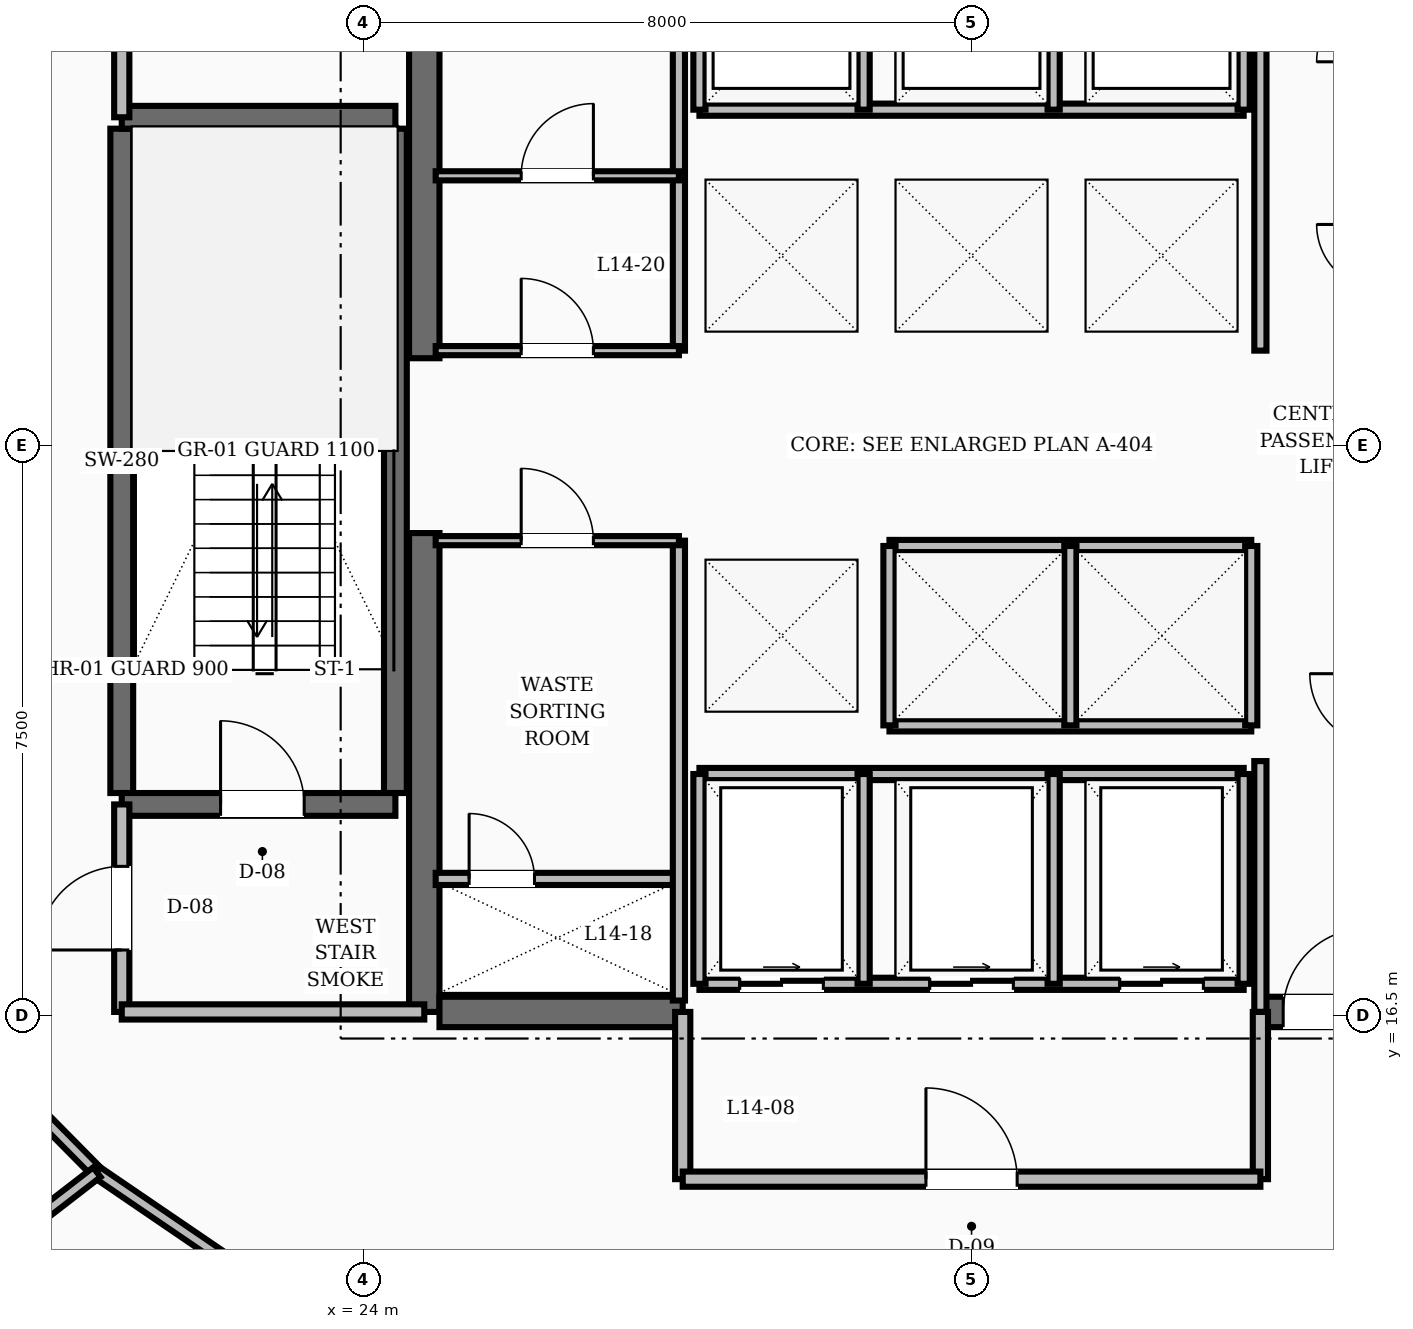
"""IFC4 building model, lengths in metres.
Left out: names, types, materials, properties, quantities, classifications, styles, units other than length and angle.
Written with IfcOpenShell. Run it as: python <this file> out.ifc"""

import sys

from ifc_helpers import new_model, si_unit, direction, frame, frame_2d, origin, place, context, subcontext, project, spatial, rectangle, extrude, element, fill, save


model = new_model("IFC4")
c1 = context("Model", 3, precision=1e-05, world=origin(), true_north=direction((0.0, 1.0)))
c2 = subcontext(c1, "Body", "Model", "MODEL_VIEW")
j1 = project(units=[si_unit("LENGTHUNIT", "METRE"), si_unit("PLANEANGLEUNIT", "RADIAN")], contexts=[c1])
p1 = place(None, origin())
s1 = spatial("IfcSite", under=j1, at=p1, CompositionType="ELEMENT")
p2 = place(p1, origin())
s2 = spatial("IfcBuilding", under=s1, at=p2, CompositionType="ELEMENT")
p3 = place(p2, frame((0.0, 0.0, 59.2)))
s3 = spatial("IfcBuildingStorey", under=s2, at=p3, CompositionType="ELEMENT", Elevation=59.2)
for number, where, z_axis, x_axis in (
    (1, (24.8, 16.55, 0.0), (0.0, 0.0, 1.0), (0.0, 1.0, 0.0)),
    (2, (24.8, 25.15, 0.0), (0.0, 0.0, 1.0), (0.0, 1.0, 0.0)),
):
    element("IfcWall", number, at=place(p3, frame(where, z_axis=z_axis, x_axis=x_axis)), inside=s3, PredefinedType="SHEAR", context=c2, shape_type="SweptSolid", body=[
        extrude(rectangle(XDim=6.3, YDim=0.4, at=frame_2d((3.15, 0.0))), origin(), (0.0, 0.0, 1.0), 3.6),
    ])
p4 = place(p3, frame((25.0, 16.55, 0.0), z_axis=(0.0, 0.0, 1.0), x_axis=(1.0, 0.0, 0.0)))
e3 = element("IfcWall", 3, at=p4, inside=s3, PredefinedType="SHEAR", context=c2, shape_type="SweptSolid", body=[
    extrude(rectangle(XDim=3.2, YDim=0.4, at=frame_2d((1.6, 0.0))), origin(), (0.0, 0.0, 1.0), 3.6),
])
p5 = place(p3, frame((35.8, 16.55, 0.0), z_axis=(0.0, 0.0, 1.0), x_axis=(1.0, 0.0, 0.0)))
e4 = element("IfcWall", 4, at=p5, inside=s3, PredefinedType="SHEAR", context=c2, shape_type="SweptSolid", body=[
    extrude(rectangle(XDim=3.2, YDim=0.4, at=frame_2d((1.6, 0.0))), origin(), (0.0, 0.0, 1.0), 3.6),
])
p6 = place(p5, frame((0.3, 0.0, 0.0)))
e5 = element("IfcOpeningElement", 5, at=p6, cuts=e4, PredefinedType="OPENING", context=c2, shape_type="SweptSolid", body=[
    extrude(rectangle(XDim=1.1, YDim=2.1, at=frame_2d((0.55, 1.05))), frame((0.0, 0.21, 0.0), z_axis=(0.0, -1.0, 0.0), x_axis=(1.0, 0.0, 0.0)), (0.0, 0.0, 1.0), 0.42),
])
for number, where, z_axis, x_axis in (
    (6, (20.82, 19.43, 0.0), (0.0, 0.0, 1.0), (0.0, 1.0, 0.0)),
    (7, (24.42, 19.43, 0.0), (0.0, 0.0, 1.0), (0.0, 1.0, 0.0)),
):
    element("IfcWall", number, at=place(p3, frame(where, z_axis=z_axis, x_axis=x_axis)), inside=s3, PredefinedType="SHEAR", context=c2, shape_type="SweptSolid", body=[
        extrude(rectangle(XDim=8.74, YDim=0.3, at=frame_2d((4.37, 0.0))), origin(), (0.0, 0.0, 1.0), 3.6),
    ])
p7 = place(p3, frame((20.82, 19.28, 0.0), z_axis=(0.0, 0.0, 1.0), x_axis=(1.0, 0.0, 0.0)))
e8 = element("IfcWall", 8, at=p7, inside=s3, PredefinedType="SHEAR", context=c2, shape_type="SweptSolid", body=[
    extrude(rectangle(XDim=3.6, YDim=0.3, at=frame_2d((1.8, 0.0))), origin(), (0.0, 0.0, 1.0), 3.6),
])
p8 = place(p7, frame((1.3, 0.0, 0.0)))
e9 = element("IfcOpeningElement", 9, at=p8, cuts=e8, PredefinedType="OPENING", context=c2, shape_type="SweptSolid", body=[
    extrude(rectangle(XDim=1.1, YDim=2.1, at=frame_2d((0.55, 1.05))), frame((0.0, 0.16, 0.0), z_axis=(0.0, -1.0, 0.0), x_axis=(1.0, 0.0, 0.0)), (0.0, 0.0, 1.0), 0.32),
])
p9 = place(p3, frame((20.82, 28.32, 0.0), z_axis=(0.0, 0.0, 1.0), x_axis=(1.0, 0.0, 0.0)))
e10 = element("IfcWall", 10, at=p9, inside=s3, PredefinedType="SHEAR", context=c2, shape_type="SweptSolid", body=[
    extrude(rectangle(XDim=3.6, YDim=0.3, at=frame_2d((1.8, 0.0))), origin(), (0.0, 0.0, 1.0), 3.6),
])
p10 = place(p3, frame((20.82, 16.55, 0.0), z_axis=(0.0, 0.0, 1.0), x_axis=(0.0, 1.0, 0.0)))
e11 = element("IfcWall", 11, at=p10, inside=s3, PredefinedType="SOLIDWALL", context=c2, shape_type="SweptSolid", body=[
    extrude(rectangle(XDim=2.73, YDim=0.2, at=frame_2d((1.365, 0.0))), origin(), (0.0, 0.0, 1.0), 2.61),
])
p11 = place(p10, frame((0.815, 0.0, 0.0)))
e12 = element("IfcOpeningElement", 12, at=p11, cuts=e11, PredefinedType="OPENING", context=c2, shape_type="SweptSolid", body=[
    extrude(rectangle(XDim=1.1, YDim=2.1, at=frame_2d((0.55, 1.05))), frame((0.0, 0.11, 0.0), z_axis=(0.0, -1.0, 0.0), x_axis=(1.0, 0.0, 0.0)), (0.0, 0.0, 1.0), 0.22),
])
p12 = place(p3, frame((20.82, 16.55, 0.0), z_axis=(0.0, 0.0, 1.0), x_axis=(1.0, 0.0, 0.0)))
e13 = element("IfcWall", 13, at=p12, inside=s3, PredefinedType="SOLIDWALL", context=c2, shape_type="SweptSolid", body=[
    extrude(rectangle(XDim=3.98, YDim=0.2, at=frame_2d((1.99, 0.0))), origin(), (0.0, 0.0, 1.0), 2.61),
])
p13 = place(p3, frame((20.82, 28.32, 0.0), z_axis=(0.0, 0.0, 1.0), x_axis=(0.0, 1.0, 0.0)))
e14 = element("IfcWall", 14, at=p13, inside=s3, PredefinedType="SOLIDWALL", context=c2, shape_type="SweptSolid", body=[
    extrude(rectangle(XDim=3.13, YDim=0.2, at=frame_2d((1.565, 0.0))), origin(), (0.0, 0.0, 1.0), 2.61),
])
p14 = place(p13, frame((1.09, 0.0, 0.0)))
e15 = element("IfcOpeningElement", 15, at=p14, cuts=e14, PredefinedType="OPENING", context=c2, shape_type="SweptSolid", body=[
    extrude(rectangle(XDim=0.95, YDim=2.1, at=frame_2d((0.475, 1.05))), frame((0.0, 0.11, 0.0), z_axis=(0.0, -1.0, 0.0), x_axis=(1.0, 0.0, 0.0)), (0.0, 0.0, 1.0), 0.22),
])
p15 = place(p3, frame((35.8, 16.55, 0.0), z_axis=(0.0, 0.0, 1.0), x_axis=(0.0, 1.0, 0.0)))
e16 = element("IfcWall", 16, at=p15, inside=s3, PredefinedType="SOLIDWALL", context=c2, shape_type="SweptSolid", body=[
    extrude(rectangle(XDim=3.3, YDim=0.16, at=frame_2d((1.65, 0.0))), origin(), (0.0, 0.0, 1.0), 2.61),
])
p16 = place(p3, frame((35.8, 25.25, 0.0), z_axis=(0.0, 0.0, 1.0), x_axis=(0.0, 1.0, 0.0)))
e17 = element("IfcWall", 17, at=p16, inside=s3, PredefinedType="SOLIDWALL", context=c2, shape_type="SweptSolid", body=[
    extrude(rectangle(XDim=6.2, YDim=0.16, at=frame_2d((3.1, 0.0))), origin(), (0.0, 0.0, 1.0), 2.61),
])
for number, where, z_axis, x_axis in (
    (18, (28.2, 14.35, 0.0), (0.0, 0.0, 1.0), (0.0, 1.0, 0.0)),
    (19, (35.8, 14.35, 0.0), (0.0, 0.0, 1.0), (0.0, 1.0, 0.0)),
):
    element("IfcWall", number, at=place(p3, frame(where, z_axis=z_axis, x_axis=x_axis)), inside=s3, PredefinedType="SOLIDWALL", context=c2, shape_type="SweptSolid", body=[
        extrude(rectangle(XDim=2.2, YDim=0.2, at=frame_2d((1.1, 0.0))), origin(), (0.0, 0.0, 1.0), 2.61),
    ])
p17 = place(p3, frame((28.2, 14.35, 0.0), z_axis=(0.0, 0.0, 1.0), x_axis=(1.0, 0.0, 0.0)))
e20 = element("IfcWall", 20, at=p17, inside=s3, PredefinedType="SOLIDWALL", context=c2, shape_type="SweptSolid", body=[
    extrude(rectangle(XDim=7.6, YDim=0.2, at=frame_2d((3.8, 0.0))), origin(), (0.0, 0.0, 1.0), 2.61),
])
p18 = place(p17, frame((3.2, 0.0, 0.0)))
e21 = element("IfcOpeningElement", 21, at=p18, cuts=e20, PredefinedType="OPENING", context=c2, shape_type="SweptSolid", body=[
    extrude(rectangle(XDim=1.2, YDim=2.1, at=frame_2d((0.6, 1.05))), frame((0.0, 0.11, 0.0), z_axis=(0.0, -1.0, 0.0), x_axis=(1.0, 0.0, 0.0)), (0.0, 0.0, 1.0), 0.22),
])
p19 = place(p3, frame((28.42, 28.42, 0.0), z_axis=(0.0, 0.0, 1.0), x_axis=(1.0, 0.0, 0.0)))
e22 = element("IfcWall", 22, at=p19, inside=s3, PredefinedType="SOLIDWALL", context=c2, shape_type="SweptSolid", body=[
    extrude(rectangle(XDim=7.16, YDim=0.16, at=frame_2d((3.58, 0.0))), origin(), (0.0, 0.0, 1.0), 2.61),
])
for number, where, z_axis, x_axis in (
    (23, (28.42, 28.42, 0.0), (0.0, 0.0, 1.0), (0.0, 1.0, 0.0)),
    (24, (30.58, 28.42, 0.0), (0.0, 0.0, 1.0), (0.0, 1.0, 0.0)),
    (25, (33.08, 28.42, 0.0), (0.0, 0.0, 1.0), (0.0, 1.0, 0.0)),
    (26, (35.58, 28.42, 0.0), (0.0, 0.0, 1.0), (0.0, 1.0, 0.0)),
):
    element("IfcWall", number, at=place(p3, frame(where, z_axis=z_axis, x_axis=x_axis)), inside=s3, PredefinedType="SOLIDWALL", context=c2, shape_type="SweptSolid", body=[
        extrude(rectangle(XDim=2.16, YDim=0.16, at=frame_2d((1.08, 0.0))), origin(), (0.0, 0.0, 1.0), 2.61),
    ])
for number, where, z_axis, x_axis in (
    (27, (30.92, 22.68, 0.0), (0.0, 0.0, 1.0), (1.0, 0.0, 0.0)),
    (28, (30.92, 20.32, 0.0), (0.0, 0.0, 1.0), (1.0, 0.0, 0.0)),
):
    element("IfcWall", number, at=place(p3, frame(where, z_axis=z_axis, x_axis=x_axis)), inside=s3, PredefinedType="SOLIDWALL", context=c2, shape_type="SweptSolid", body=[
        extrude(rectangle(XDim=4.76, YDim=0.16, at=frame_2d((2.38, 0.0))), origin(), (0.0, 0.0, 1.0), 2.61),
    ])
for number, where, z_axis, x_axis in (
    (29, (30.92, 20.32, 0.0), (0.0, 0.0, 1.0), (0.0, 1.0, 0.0)),
    (30, (33.3, 20.32, 0.0), (0.0, 0.0, 1.0), (0.0, 1.0, 0.0)),
    (31, (35.68, 20.32, 0.0), (0.0, 0.0, 1.0), (0.0, 1.0, 0.0)),
):
    element("IfcWall", number, at=place(p3, frame(where, z_axis=z_axis, x_axis=x_axis)), inside=s3, PredefinedType="SOLIDWALL", context=c2, shape_type="SweptSolid", body=[
        extrude(rectangle(XDim=2.36, YDim=0.16, at=frame_2d((1.18, 0.0))), origin(), (0.0, 0.0, 1.0), 2.61),
    ])
p20 = place(p3, frame((28.42, 16.92, 0.0), z_axis=(0.0, 0.0, 1.0), x_axis=(1.0, 0.0, 0.0)))
e32 = element("IfcWall", 32, at=p20, inside=s3, PredefinedType="SOLIDWALL", context=c2, shape_type="SweptSolid", body=[
    extrude(rectangle(XDim=7.16, YDim=0.16, at=frame_2d((3.58, 0.0))), origin(), (0.0, 0.0, 1.0), 2.61),
])
p21 = place(p20, frame((0.53, 0.0, 0.0)))
e33 = element("IfcOpeningElement", 33, at=p21, cuts=e32, PredefinedType="OPENING", context=c2, shape_type="SweptSolid", body=[
    extrude(rectangle(XDim=1.1, YDim=2.15, at=frame_2d((0.55, 1.075))), frame((0.0, 0.09, 0.0), z_axis=(0.0, -1.0, 0.0), x_axis=(1.0, 0.0, 0.0)), (0.0, 0.0, 1.0), 0.18),
])
p22 = place(p20, frame((3.03, 0.0, 0.0)))
e34 = element("IfcOpeningElement", 34, at=p22, cuts=e32, PredefinedType="OPENING", context=c2, shape_type="SweptSolid", body=[
    extrude(rectangle(XDim=1.1, YDim=2.15, at=frame_2d((0.55, 1.075))), frame((0.0, 0.09, 0.0), z_axis=(0.0, -1.0, 0.0), x_axis=(1.0, 0.0, 0.0)), (0.0, 0.0, 1.0), 0.18),
])
p23 = place(p20, frame((5.53, 0.0, 0.0)))
e35 = element("IfcOpeningElement", 35, at=p23, cuts=e32, PredefinedType="OPENING", context=c2, shape_type="SweptSolid", body=[
    extrude(rectangle(XDim=1.1, YDim=2.15, at=frame_2d((0.55, 1.075))), frame((0.0, 0.09, 0.0), z_axis=(0.0, -1.0, 0.0), x_axis=(1.0, 0.0, 0.0)), (0.0, 0.0, 1.0), 0.18),
])
p24 = place(p3, frame((28.42, 19.68, 0.0), z_axis=(0.0, 0.0, 1.0), x_axis=(1.0, 0.0, 0.0)))
e36 = element("IfcWall", 36, at=p24, inside=s3, PredefinedType="SOLIDWALL", context=c2, shape_type="SweptSolid", body=[
    extrude(rectangle(XDim=7.16, YDim=0.16, at=frame_2d((3.58, 0.0))), origin(), (0.0, 0.0, 1.0), 2.61),
])
for number, where, z_axis, x_axis in (
    (37, (28.42, 16.92, 0.0), (0.0, 0.0, 1.0), (0.0, 1.0, 0.0)),
    (38, (30.58, 16.92, 0.0), (0.0, 0.0, 1.0), (0.0, 1.0, 0.0)),
    (39, (33.08, 16.92, 0.0), (0.0, 0.0, 1.0), (0.0, 1.0, 0.0)),
    (40, (35.58, 16.92, 0.0), (0.0, 0.0, 1.0), (0.0, 1.0, 0.0)),
):
    element("IfcWall", number, at=place(p3, frame(where, z_axis=z_axis, x_axis=x_axis)), inside=s3, PredefinedType="SOLIDWALL", context=c2, shape_type="SweptSolid", body=[
        extrude(rectangle(XDim=2.76, YDim=0.16, at=frame_2d((1.38, 0.0))), origin(), (0.0, 0.0, 1.0), 2.61),
    ])
p25 = place(p3, frame((24.95, 18.3, 0.0), z_axis=(0.0, 0.0, 1.0), x_axis=(1.0, 0.0, 0.0)))
e41 = element("IfcWall", 41, at=p25, inside=s3, PredefinedType="SOLIDWALL", context=c2, shape_type="SweptSolid", body=[
    extrude(rectangle(XDim=3.2, YDim=0.16, at=frame_2d((1.6, 0.0))), origin(), (0.0, 0.0, 1.0), 2.61),
])
p26 = place(p25, frame((0.44, 0.0, 0.0)))
e42 = element("IfcOpeningElement", 42, at=p26, cuts=e41, PredefinedType="OPENING", context=c2, shape_type="SweptSolid", body=[
    extrude(rectangle(XDim=0.86, YDim=2.05, at=frame_2d((0.43, 1.025))), frame((0.0, 0.09, 0.0), z_axis=(0.0, -1.0, 0.0), x_axis=(1.0, 0.0, 0.0)), (0.0, 0.0, 1.0), 0.18),
])
p27 = place(p3, frame((28.15, 16.7, 0.0), z_axis=(0.0, 0.0, 1.0), x_axis=(0.0, 1.0, 0.0)))
e43 = element("IfcWall", 43, at=p27, inside=s3, PredefinedType="SOLIDWALL", context=c2, shape_type="SweptSolid", body=[
    extrude(rectangle(XDim=6.05, YDim=0.16, at=frame_2d((3.025, 0.0))), origin(), (0.0, 0.0, 1.0), 2.61),
])
p28 = place(p3, frame((28.15, 25.25, 0.0), z_axis=(0.0, 0.0, 1.0), x_axis=(0.0, 1.0, 0.0)))
e44 = element("IfcWall", 44, at=p28, inside=s3, PredefinedType="SOLIDWALL", context=c2, shape_type="SweptSolid", body=[
    extrude(rectangle(XDim=6.1, YDim=0.16, at=frame_2d((3.05, 0.0))), origin(), (0.0, 0.0, 1.0), 2.61),
])
p29 = place(p3, frame((24.95, 25.25, 0.0), z_axis=(0.0, 0.0, 1.0), x_axis=(1.0, 0.0, 0.0)))
e45 = element("IfcWall", 45, at=p29, inside=s3, PredefinedType="PARTITIONING", context=c2, shape_type="SweptSolid", body=[
    extrude(rectangle(XDim=3.2, YDim=0.12, at=frame_2d((1.6, 0.0))), origin(), (0.0, 0.0, 1.0), 2.61),
])
p30 = place(p29, frame((1.125, 0.0, 0.0)))
e46 = element("IfcOpeningElement", 46, at=p30, cuts=e45, PredefinedType="OPENING", context=c2, shape_type="SweptSolid", body=[
    extrude(rectangle(XDim=0.95, YDim=2.1, at=frame_2d((0.475, 1.05))), frame((0.0, 0.07, 0.0), z_axis=(0.0, -1.0, 0.0), x_axis=(1.0, 0.0, 0.0)), (0.0, 0.0, 1.0), 0.14),
])
p31 = place(p3, frame((24.95, 22.75, 0.0), z_axis=(0.0, 0.0, 1.0), x_axis=(1.0, 0.0, 0.0)))
e47 = element("IfcWall", 47, at=p31, inside=s3, PredefinedType="PARTITIONING", context=c2, shape_type="SweptSolid", body=[
    extrude(rectangle(XDim=3.2, YDim=0.12, at=frame_2d((1.6, 0.0))), origin(), (0.0, 0.0, 1.0), 2.61),
])
p32 = place(p31, frame((1.125, 0.0, 0.0)))
e48 = element("IfcOpeningElement", 48, at=p32, cuts=e47, PredefinedType="OPENING", context=c2, shape_type="SweptSolid", body=[
    extrude(rectangle(XDim=0.95, YDim=2.1, at=frame_2d((0.475, 1.05))), frame((0.0, 0.07, 0.0), z_axis=(0.0, -1.0, 0.0), x_axis=(1.0, 0.0, 0.0)), (0.0, 0.0, 1.0), 0.14),
])
p33 = place(p3, frame((24.95, 27.55, 0.0), z_axis=(0.0, 0.0, 1.0), x_axis=(1.0, 0.0, 0.0)))
e49 = element("IfcWall", 49, at=p33, inside=s3, PredefinedType="PARTITIONING", context=c2, shape_type="SweptSolid", body=[
    extrude(rectangle(XDim=3.2, YDim=0.12, at=frame_2d((1.6, 0.0))), origin(), (0.0, 0.0, 1.0), 2.61),
])
p34 = place(p33, frame((1.125, 0.0, 0.0)))
e50 = element("IfcOpeningElement", 50, at=p34, cuts=e49, PredefinedType="OPENING", context=c2, shape_type="SweptSolid", body=[
    extrude(rectangle(XDim=0.95, YDim=2.1, at=frame_2d((0.475, 1.05))), frame((0.0, 0.07, 0.0), z_axis=(0.0, -1.0, 0.0), x_axis=(1.0, 0.0, 0.0)), (0.0, 0.0, 1.0), 0.14),
])
p35 = place(p3, frame((18.469, 16.49, 0.0), z_axis=(0.0, 0.0, 1.0), x_axis=(0.702811997, -0.711375636969, 0.0)))
e51 = element("IfcWall", 51, at=p35, inside=s3, PredefinedType="SOLIDWALL", context=c2, shape_type="SweptSolid", body=[
    extrude(rectangle(XDim=2.879, YDim=0.16, at=frame_2d((1.44, 0.0))), origin(), (0.0, 0.0, 1.0), 2.61),
])
p36 = place(p3, frame((20.492, 14.441, 0.0), z_axis=(0.0, 0.0, 1.0), x_axis=(0.826293096206, -0.56324037423, 0.0)))
e52 = element("IfcWall", 52, at=p36, inside=s3, PredefinedType="SOLIDWALL", context=c2, shape_type="SweptSolid", body=[
    extrude(rectangle(XDim=2.985, YDim=0.16, at=frame_2d((1.492, 0.0))), origin(), (0.0, 0.0, 1.0), 2.61),
])
p37 = place(p3, frame((20.492, 14.441, 0.0), z_axis=(0.0, 0.0, 1.0), x_axis=(-0.791235454553, -0.611511615145, 0.0)))
e53 = element("IfcWall", 53, at=p37, inside=s3, PredefinedType="SOLIDWALL", context=c2, shape_type="SweptSolid", body=[
    extrude(rectangle(XDim=8.778, YDim=0.16, at=frame_2d((4.389, 0.0))), origin(), (0.0, 0.0, 1.0), 2.61),
])
p38 = place(p8, origin())
e54 = element("IfcDoor", 54, at=p38, inside=s3, OperationType="SINGLE_SWING_LEFT", PredefinedType="DOOR", context=c2, shape_type="SweptSolid", body=[
    extrude(rectangle(XDim=1.1, YDim=2.1, at=frame_2d((0.55, 1.05))), frame((0.0, 0.025, 0.0), z_axis=(0.0, -1.0, 0.0), x_axis=(1.0, 0.0, 0.0)), (0.0, 0.0, 1.0), 0.05),
])
fill(e9, e54)
p39 = place(p11, origin())
e55 = element("IfcDoor", 55, at=p39, inside=s3, OperationType="SINGLE_SWING_LEFT", PredefinedType="DOOR", context=c2, shape_type="SweptSolid", body=[
    extrude(rectangle(XDim=1.1, YDim=2.1, at=frame_2d((0.55, 1.05))), frame((0.0, 0.025, 0.0), z_axis=(0.0, -1.0, 0.0), x_axis=(1.0, 0.0, 0.0)), (0.0, 0.0, 1.0), 0.05),
])
fill(e12, e55)
p40 = place(p6, origin())
e56 = element("IfcDoor", 56, at=p40, inside=s3, OperationType="SINGLE_SWING_RIGHT", PredefinedType="DOOR", context=c2, shape_type="SweptSolid", body=[
    extrude(rectangle(XDim=1.1, YDim=2.1, at=frame_2d((0.55, 1.05))), frame((0.0, 0.025, 0.0), z_axis=(0.0, -1.0, 0.0), x_axis=(1.0, 0.0, 0.0)), (0.0, 0.0, 1.0), 0.05),
])
fill(e5, e56)
p41 = place(p18, origin())
e57 = element("IfcDoor", 57, at=p41, inside=s3, OperationType="SINGLE_SWING_LEFT", PredefinedType="DOOR", context=c2, shape_type="SweptSolid", body=[
    extrude(rectangle(XDim=1.2, YDim=2.1, at=frame_2d((0.6, 1.05))), frame((0.0, 0.025, 0.0), z_axis=(0.0, -1.0, 0.0), x_axis=(1.0, 0.0, 0.0)), (0.0, 0.0, 1.0), 0.05),
])
fill(e21, e57)
p42 = place(p21, origin())
e58 = element("IfcDoor", 58, at=p42, inside=s3, OperationType="SLIDING_TO_RIGHT", PredefinedType="DOOR", context=c2, shape_type="SweptSolid", body=[
    extrude(rectangle(XDim=1.1, YDim=2.15, at=frame_2d((0.55, 1.075))), frame((0.0, 0.025, 0.0), z_axis=(0.0, -1.0, 0.0), x_axis=(1.0, 0.0, 0.0)), (0.0, 0.0, 1.0), 0.05),
])
fill(e33, e58)
p43 = place(p22, origin())
e59 = element("IfcDoor", 59, at=p43, inside=s3, OperationType="SLIDING_TO_RIGHT", PredefinedType="DOOR", context=c2, shape_type="SweptSolid", body=[
    extrude(rectangle(XDim=1.1, YDim=2.15, at=frame_2d((0.55, 1.075))), frame((0.0, 0.025, 0.0), z_axis=(0.0, -1.0, 0.0), x_axis=(1.0, 0.0, 0.0)), (0.0, 0.0, 1.0), 0.05),
])
fill(e34, e59)
p44 = place(p23, origin())
e60 = element("IfcDoor", 60, at=p44, inside=s3, OperationType="SLIDING_TO_RIGHT", PredefinedType="DOOR", context=c2, shape_type="SweptSolid", body=[
    extrude(rectangle(XDim=1.1, YDim=2.15, at=frame_2d((0.55, 1.075))), frame((0.0, 0.025, 0.0), z_axis=(0.0, -1.0, 0.0), x_axis=(1.0, 0.0, 0.0)), (0.0, 0.0, 1.0), 0.05),
])
fill(e35, e60)
p45 = place(p26, origin())
e61 = element("IfcDoor", 61, at=p45, inside=s3, OperationType="SINGLE_SWING_LEFT", PredefinedType="TRAPDOOR", context=c2, shape_type="SweptSolid", body=[
    extrude(rectangle(XDim=0.86, YDim=2.05, at=frame_2d((0.43, 1.025))), frame((0.0, 0.025, 0.0), z_axis=(0.0, -1.0, 0.0), x_axis=(1.0, 0.0, 0.0)), (0.0, 0.0, 1.0), 0.05),
])
fill(e42, e61)
p46 = place(p30, origin())
e62 = element("IfcDoor", 62, at=p46, inside=s3, OperationType="SINGLE_SWING_LEFT", PredefinedType="DOOR", context=c2, shape_type="SweptSolid", body=[
    extrude(rectangle(XDim=0.95, YDim=2.1, at=frame_2d((0.475, 1.05))), frame((0.0, 0.025, 0.0), z_axis=(0.0, -1.0, 0.0), x_axis=(1.0, 0.0, 0.0)), (0.0, 0.0, 1.0), 0.05),
])
fill(e46, e62)
p47 = place(p34, origin())
e63 = element("IfcDoor", 63, at=p47, inside=s3, OperationType="SINGLE_SWING_RIGHT", PredefinedType="DOOR", context=c2, shape_type="SweptSolid", body=[
    extrude(rectangle(XDim=0.95, YDim=2.1, at=frame_2d((0.475, 1.05))), frame((0.0, 0.025, 0.0), z_axis=(0.0, -1.0, 0.0), x_axis=(1.0, 0.0, 0.0)), (0.0, 0.0, 1.0), 0.05),
])
fill(e50, e63)
p48 = place(p32, origin())
e64 = element("IfcDoor", 64, at=p48, inside=s3, OperationType="SINGLE_SWING_LEFT", PredefinedType="DOOR", context=c2, shape_type="SweptSolid", body=[
    extrude(rectangle(XDim=0.95, YDim=2.1, at=frame_2d((0.475, 1.05))), frame((0.0, 0.025, 0.0), z_axis=(0.0, -1.0, 0.0), x_axis=(1.0, 0.0, 0.0)), (0.0, 0.0, 1.0), 0.05),
])
fill(e48, e64)
save(model, sys.argv[1])
